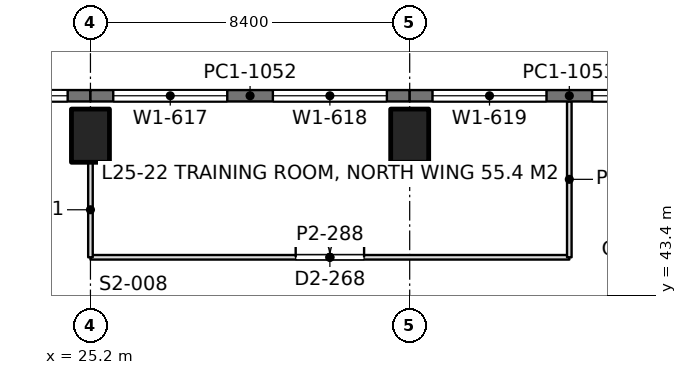
"""IFC4 building model, lengths in metres.
Left out: names, types, materials, properties, quantities, classifications, styles, units other than length and angle.
Written with IfcOpenShell. Run it as: python <this file> out.ifc"""

import sys

from ifc_helpers import new_model, si_unit, direction, frame, frame_2d, origin, origin_2d, place, context, subcontext, project, spatial, rectangle, extrude, element, fill, save


model = new_model("IFC4")
c1 = context("Model", 3, precision=1e-05, world=origin(), true_north=direction((0.0, 1.0)))
c2 = subcontext(c1, "Body", "Model", "MODEL_VIEW")
j1 = project(units=[si_unit("LENGTHUNIT", "METRE"), si_unit("PLANEANGLEUNIT", "RADIAN")], contexts=[c1])
p1 = place(None, origin())
s1 = spatial("IfcSite", under=j1, at=p1, CompositionType="ELEMENT")
p2 = place(p1, origin())
s2 = spatial("IfcBuilding", under=s1, at=p2, CompositionType="ELEMENT")
p3 = place(p2, frame((0.0, 0.0, 113.4)))
s3 = spatial("IfcBuildingStorey", under=s2, at=p3, CompositionType="ELEMENT", Elevation=113.4)
for number, where, z_axis, x_axis in (
    (1, (25.2, 47.6, 0.0), (0.0, 0.0, 1.0), (1.0, 0.0, 0.0)),
    (2, (33.6, 47.6, 0.0), (0.0, 0.0, 1.0), (1.0, 0.0, 0.0)),
):
    element("IfcColumn", number, at=place(p3, frame(where, z_axis=z_axis, x_axis=x_axis)), inside=s3, PredefinedType="COLUMN", context=c2, shape_type="SweptSolid", body=[
        extrude(rectangle(XDim=1.0, YDim=1.4, at=origin_2d()), origin(), (0.0, 0.0, 1.0), 4.2),
    ])
p4 = place(p3, frame((16.8, 48.65, 0.0), z_axis=(0.0, 0.0, 1.0), x_axis=(1.0, 0.0, 0.0)))
e3 = element("IfcWall", 3, at=p4, inside=s3, PredefinedType="SOLIDWALL", context=c2, shape_type="SweptSolid", body=[
    extrude(rectangle(XDim=8.4, YDim=0.3, at=frame_2d((4.2, 0.0))), origin(), (0.0, 0.0, 1.0), 4.05),
])
p5 = place(p4, frame((0.6, 0.0, 0.9)))
e4 = element("IfcOpeningElement", 4, at=p5, cuts=e3, PredefinedType="OPENING", context=c2, shape_type="SweptSolid", body=[
    extrude(rectangle(XDim=3.0, YDim=1.9, at=frame_2d((1.5, 0.95))), frame((0.0, 0.16, 0.0), z_axis=(0.0, -1.0, 0.0), x_axis=(1.0, 0.0, 0.0)), (0.0, 0.0, 1.0), 0.32),
])
p6 = place(p4, frame((4.8, 0.0, 0.9)))
e5 = element("IfcOpeningElement", 5, at=p6, cuts=e3, PredefinedType="OPENING", context=c2, shape_type="SweptSolid", body=[
    extrude(rectangle(XDim=3.0, YDim=1.9, at=frame_2d((1.5, 0.95))), frame((0.0, 0.16, 0.0), z_axis=(0.0, -1.0, 0.0), x_axis=(1.0, 0.0, 0.0)), (0.0, 0.0, 1.0), 0.32),
])
p7 = place(p3, frame((25.2, 48.65, 0.0), z_axis=(0.0, 0.0, 1.0), x_axis=(1.0, 0.0, 0.0)))
e6 = element("IfcWall", 6, at=p7, inside=s3, PredefinedType="SOLIDWALL", context=c2, shape_type="SweptSolid", body=[
    extrude(rectangle(XDim=8.4, YDim=0.3, at=frame_2d((4.2, 0.0))), origin(), (0.0, 0.0, 1.0), 4.05),
])
p8 = place(p7, frame((0.6, 0.0, 0.9)))
e7 = element("IfcOpeningElement", 7, at=p8, cuts=e6, PredefinedType="OPENING", context=c2, shape_type="SweptSolid", body=[
    extrude(rectangle(XDim=3.0, YDim=1.9, at=frame_2d((1.5, 0.95))), frame((0.0, 0.16, 0.0), z_axis=(0.0, -1.0, 0.0), x_axis=(1.0, 0.0, 0.0)), (0.0, 0.0, 1.0), 0.32),
])
p9 = place(p7, frame((4.8, 0.0, 0.9)))
e8 = element("IfcOpeningElement", 8, at=p9, cuts=e6, PredefinedType="OPENING", context=c2, shape_type="SweptSolid", body=[
    extrude(rectangle(XDim=3.0, YDim=1.9, at=frame_2d((1.5, 0.95))), frame((0.0, 0.16, 0.0), z_axis=(0.0, -1.0, 0.0), x_axis=(1.0, 0.0, 0.0)), (0.0, 0.0, 1.0), 0.32),
])
p10 = place(p3, frame((33.6, 48.65, 0.0), z_axis=(0.0, 0.0, 1.0), x_axis=(1.0, 0.0, 0.0)))
e9 = element("IfcWall", 9, at=p10, inside=s3, PredefinedType="SOLIDWALL", context=c2, shape_type="SweptSolid", body=[
    extrude(rectangle(XDim=8.4, YDim=0.3, at=frame_2d((4.2, 0.0))), origin(), (0.0, 0.0, 1.0), 4.05),
])
p11 = place(p10, frame((0.6, 0.0, 0.9)))
e10 = element("IfcOpeningElement", 10, at=p11, cuts=e9, PredefinedType="OPENING", context=c2, shape_type="SweptSolid", body=[
    extrude(rectangle(XDim=3.0, YDim=1.9, at=frame_2d((1.5, 0.95))), frame((0.0, 0.16, 0.0), z_axis=(0.0, -1.0, 0.0), x_axis=(1.0, 0.0, 0.0)), (0.0, 0.0, 1.0), 0.32),
])
p12 = place(p10, frame((4.8, 0.0, 0.9)))
e11 = element("IfcOpeningElement", 11, at=p12, cuts=e9, PredefinedType="OPENING", context=c2, shape_type="SweptSolid", body=[
    extrude(rectangle(XDim=3.0, YDim=1.9, at=frame_2d((1.5, 0.95))), frame((0.0, 0.16, 0.0), z_axis=(0.0, -1.0, 0.0), x_axis=(1.0, 0.0, 0.0)), (0.0, 0.0, 1.0), 0.32),
])
p13 = place(p3, frame((25.2, 44.4, 0.0), z_axis=(0.0, 0.0, 1.0), x_axis=(1.0, 0.0, 0.0)))
e12 = element("IfcWall", 12, at=p13, inside=s3, PredefinedType="PARTITIONING", context=c2, shape_type="SweptSolid", body=[
    extrude(rectangle(XDim=12.6, YDim=0.12, at=frame_2d((6.3, 0.0))), origin(), (0.0, 0.0, 1.0), 3.55),
])
p14 = place(p13, frame((5.4, 0.0, 0.0)))
e13 = element("IfcOpeningElement", 13, at=p14, cuts=e12, PredefinedType="OPENING", context=c2, shape_type="SweptSolid", body=[
    extrude(rectangle(XDim=1.8, YDim=2.2, at=frame_2d((0.9, 1.1))), frame((0.0, 0.07, 0.0), z_axis=(0.0, -1.0, 0.0), x_axis=(1.0, 0.0, 0.0)), (0.0, 0.0, 1.0), 0.14),
])
p15 = place(p3, frame((25.2, 44.4, 0.0), z_axis=(0.0, 0.0, 1.0), x_axis=(0.0, 1.0, 0.0)))
e14 = element("IfcWall", 14, at=p15, inside=s3, PredefinedType="PARTITIONING", context=c2, shape_type="SweptSolid", body=[
    extrude(rectangle(XDim=2.501, YDim=0.12, at=frame_2d((1.25, 0.0))), origin(), (0.0, 0.0, 1.0), 3.55),
])
p16 = place(p3, frame((37.8, 44.4, 0.0), z_axis=(0.0, 0.0, 1.0), x_axis=(0.0, 1.0, 0.0)))
e15 = element("IfcWall", 15, at=p16, inside=s3, PredefinedType="PARTITIONING", context=c2, shape_type="SweptSolid", body=[
    extrude(rectangle(XDim=4.102, YDim=0.12, at=frame_2d((2.051, 0.0))), origin(), (0.0, 0.0, 1.0), 3.56),
])
p17 = place(p6, origin())
e16 = element("IfcWindow", 16, at=p17, inside=s3, PartitioningType="SINGLE_PANEL", PredefinedType="WINDOW", context=c2, shape_type="SweptSolid", body=[
    extrude(rectangle(XDim=3.0, YDim=1.9, at=frame_2d((1.5, 0.95))), frame((0.0, 0.03, 0.0), z_axis=(0.0, -1.0, 0.0), x_axis=(1.0, 0.0, 0.0)), (0.0, 0.0, 1.0), 0.06),
])
fill(e5, e16)
p18 = place(p8, origin())
e17 = element("IfcWindow", 17, at=p18, inside=s3, PartitioningType="SINGLE_PANEL", PredefinedType="WINDOW", context=c2, shape_type="SweptSolid", body=[
    extrude(rectangle(XDim=3.0, YDim=1.9, at=frame_2d((1.5, 0.95))), frame((0.0, 0.03, 0.0), z_axis=(0.0, -1.0, 0.0), x_axis=(1.0, 0.0, 0.0)), (0.0, 0.0, 1.0), 0.06),
])
fill(e7, e17)
p19 = place(p9, origin())
e18 = element("IfcWindow", 18, at=p19, inside=s3, PartitioningType="SINGLE_PANEL", PredefinedType="WINDOW", context=c2, shape_type="SweptSolid", body=[
    extrude(rectangle(XDim=3.0, YDim=1.9, at=frame_2d((1.5, 0.95))), frame((0.0, 0.03, 0.0), z_axis=(0.0, -1.0, 0.0), x_axis=(1.0, 0.0, 0.0)), (0.0, 0.0, 1.0), 0.06),
])
fill(e8, e18)
p20 = place(p11, origin())
e19 = element("IfcWindow", 19, at=p20, inside=s3, PartitioningType="SINGLE_PANEL", PredefinedType="WINDOW", context=c2, shape_type="SweptSolid", body=[
    extrude(rectangle(XDim=3.0, YDim=1.9, at=frame_2d((1.5, 0.95))), frame((0.0, 0.03, 0.0), z_axis=(0.0, -1.0, 0.0), x_axis=(1.0, 0.0, 0.0)), (0.0, 0.0, 1.0), 0.06),
])
fill(e10, e19)
p21 = place(p12, origin())
e20 = element("IfcWindow", 20, at=p21, inside=s3, PartitioningType="SINGLE_PANEL", PredefinedType="WINDOW", context=c2, shape_type="SweptSolid", body=[
    extrude(rectangle(XDim=3.0, YDim=1.9, at=frame_2d((1.5, 0.95))), frame((0.0, 0.03, 0.0), z_axis=(0.0, -1.0, 0.0), x_axis=(1.0, 0.0, 0.0)), (0.0, 0.0, 1.0), 0.06),
])
fill(e11, e20)
p22 = place(p14, origin())
e21 = element("IfcDoor", 21, at=p22, inside=s3, OperationType="DOUBLE_DOOR_SINGLE_SWING", PredefinedType="DOOR", context=c2, shape_type="SweptSolid", body=[
    extrude(rectangle(XDim=1.8, YDim=2.2, at=frame_2d((0.9, 1.1))), frame((0.0, 0.025, 0.0), z_axis=(0.0, -1.0, 0.0), x_axis=(1.0, 0.0, 0.0)), (0.0, 0.0, 1.0), 0.05),
])
fill(e13, e21)
save(model, sys.argv[1])
